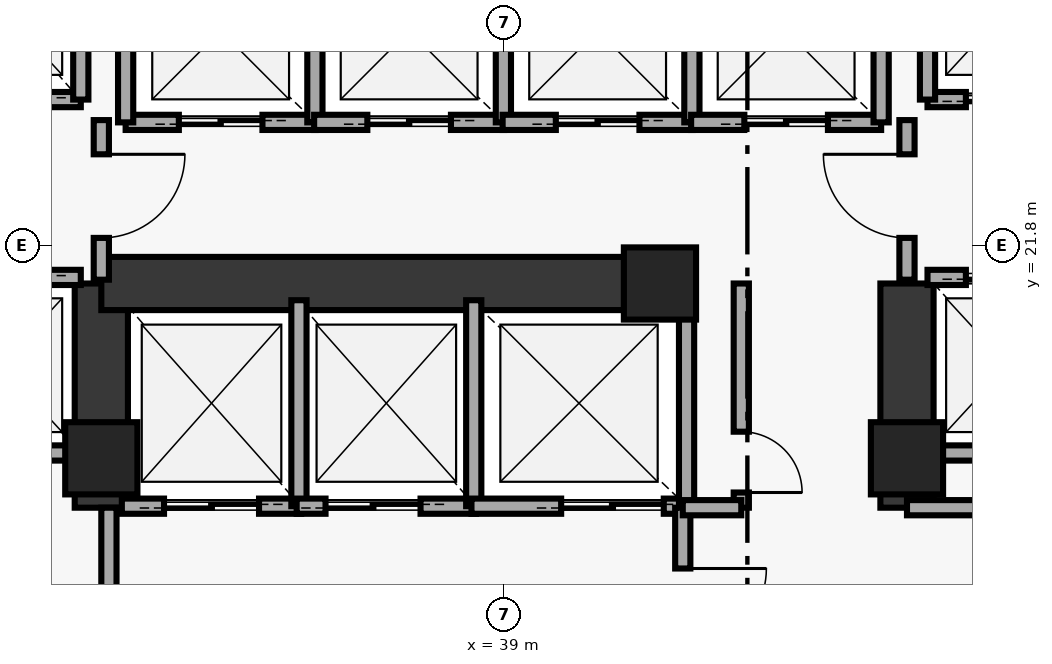
"""IFC4 building model, lengths in metres.
Left out: names, types, materials, properties, quantities, classifications, styles, units other than length and angle.
Written with IfcOpenShell. Run it as: python <this file> out.ifc"""

import sys

from ifc_helpers import new_model, si_unit, direction, frame, frame_2d, origin, origin_2d, place, context, subcontext, project, spatial, rectangle, extrude, element, fill, save


model = new_model("IFC4")
c1 = context("Model", 3, precision=1e-05, world=origin(), true_north=direction((0.0, 1.0)))
c2 = subcontext(c1, "Body", "Model", "MODEL_VIEW")
j1 = project(units=[si_unit("LENGTHUNIT", "METRE"), si_unit("PLANEANGLEUNIT", "RADIAN")], contexts=[c1])
p1 = place(None, origin())
s1 = spatial("IfcSite", under=j1, at=p1, CompositionType="ELEMENT")
p2 = place(p1, origin())
s2 = spatial("IfcBuilding", under=s1, at=p2, CompositionType="ELEMENT")
p3 = place(p2, frame((0.0, 0.0, 113.25)))
s3 = spatial("IfcBuildingStorey", under=s2, at=p3, CompositionType="ELEMENT", Elevation=113.25)
for number, where, z_axis, x_axis in (
    (1, (33.7, 19.0, 0.0), (0.0, 0.0, 1.0), (1.0, 0.0, 0.0)),
    (2, (41.05, 21.3, 0.0), (0.0, 0.0, 1.0), (1.0, 0.0, 0.0)),
    (3, (44.3, 19.0, 0.0), (0.0, 0.0, 1.0), (1.0, 0.0, 0.0)),
):
    element("IfcColumn", number, at=place(p3, frame(where, z_axis=z_axis, x_axis=x_axis)), inside=s3, PredefinedType="PILASTER", context=c2, shape_type="SweptSolid", body=[
        extrude(rectangle(XDim=0.95, YDim=0.95, at=origin_2d()), origin(), (0.0, 0.0, 1.0), 4.75),
    ])
for number, where, z_axis, x_axis in (
    (4, (33.7, 18.35, 0.0), (0.0, 0.0, 1.0), (0.0, 1.0, 0.0)),
    (5, (44.3, 18.35, 0.0), (0.0, 0.0, 1.0), (0.0, 1.0, 0.0)),
):
    element("IfcWall", number, at=place(p3, frame(where, z_axis=z_axis, x_axis=x_axis)), inside=s3, PredefinedType="SHEAR", context=c2, shape_type="SweptSolid", body=[
        extrude(rectangle(XDim=2.95, YDim=0.7, at=frame_2d((1.475, 0.0))), origin(), (0.0, 0.0, 1.0), 4.75),
    ])
p4 = place(p3, frame((33.7, 21.3, 0.0), z_axis=(0.0, 0.0, 1.0), x_axis=(1.0, 0.0, 0.0)))
e6 = element("IfcWall", 6, at=p4, inside=s3, PredefinedType="SHEAR", context=c2, shape_type="SweptSolid", body=[
    extrude(rectangle(XDim=7.55, YDim=0.7, at=frame_2d((3.775, 0.0))), origin(), (0.0, 0.0, 1.0), 4.75),
])
p5 = place(p3, frame((31.32, 23.72, 0.0), z_axis=(0.0, 0.0, 1.0), x_axis=(1.0, 0.0, 0.0)))
e7 = element("IfcWall", 7, at=p5, inside=s3, PredefinedType="SOLIDWALL", context=c2, shape_type="SweptSolid", body=[
    extrude(rectangle(XDim=2.11, YDim=0.2, at=frame_2d((1.055, 0.0))), origin(), (0.0, 0.0, 1.0), 4.75),
])
p6 = place(p5, frame((0.505, 0.0, 0.0)))
e8 = element("IfcOpeningElement", 8, at=p6, cuts=e7, PredefinedType="OPENING", context=c2, shape_type="SweptSolid", body=[
    extrude(rectangle(XDim=1.1, YDim=2.15, at=frame_2d((0.55, 1.075))), frame((0.0, 0.11, 0.0), z_axis=(0.0, -1.0, 0.0), x_axis=(1.0, 0.0, 0.0)), (0.0, 0.0, 1.0), 0.22),
])
p7 = place(p3, frame((33.43, 23.72, 0.0), z_axis=(0.0, 0.0, 1.0), x_axis=(0.0, 1.0, 0.0)))
e9 = element("IfcWall", 9, at=p7, inside=s3, PredefinedType="SOLIDWALL", context=c2, shape_type="SweptSolid", body=[
    extrude(rectangle(XDim=2.41, YDim=0.2, at=frame_2d((1.205, 0.0))), origin(), (0.0, 0.0, 1.0), 4.75),
])
p8 = place(p3, frame((31.32, 19.07, 0.0), z_axis=(0.0, 0.0, 1.0), x_axis=(1.0, 0.0, 0.0)))
e10 = element("IfcWall", 10, at=p8, inside=s3, PredefinedType="SOLIDWALL", context=c2, shape_type="SweptSolid", body=[
    extrude(rectangle(XDim=2.11, YDim=0.2, at=frame_2d((1.055, 0.0))), origin(), (0.0, 0.0, 1.0), 4.75),
])
p9 = place(p3, frame((31.32, 21.38, 0.0), z_axis=(0.0, 0.0, 1.0), x_axis=(1.0, 0.0, 0.0)))
e11 = element("IfcWall", 11, at=p9, inside=s3, PredefinedType="SOLIDWALL", context=c2, shape_type="SweptSolid", body=[
    extrude(rectangle(XDim=2.11, YDim=0.2, at=frame_2d((1.055, 0.0))), origin(), (0.0, 0.0, 1.0), 4.75),
])
p10 = place(p9, frame((0.505, 0.0, 0.0)))
e12 = element("IfcOpeningElement", 12, at=p10, cuts=e11, PredefinedType="OPENING", context=c2, shape_type="SweptSolid", body=[
    extrude(rectangle(XDim=1.1, YDim=2.15, at=frame_2d((0.55, 1.075))), frame((0.0, 0.11, 0.0), z_axis=(0.0, -1.0, 0.0), x_axis=(1.0, 0.0, 0.0)), (0.0, 0.0, 1.0), 0.22),
])
p11 = place(p3, frame((44.57, 23.72, 0.0), z_axis=(0.0, 0.0, 1.0), x_axis=(1.0, 0.0, 0.0)))
e13 = element("IfcWall", 13, at=p11, inside=s3, PredefinedType="SOLIDWALL", context=c2, shape_type="SweptSolid", body=[
    extrude(rectangle(XDim=2.11, YDim=0.2, at=frame_2d((1.055, 0.0))), origin(), (0.0, 0.0, 1.0), 4.75),
])
p12 = place(p11, frame((0.505, 0.0, 0.0)))
e14 = element("IfcOpeningElement", 14, at=p12, cuts=e13, PredefinedType="OPENING", context=c2, shape_type="SweptSolid", body=[
    extrude(rectangle(XDim=1.1, YDim=2.15, at=frame_2d((0.55, 1.075))), frame((0.0, 0.11, 0.0), z_axis=(0.0, -1.0, 0.0), x_axis=(1.0, 0.0, 0.0)), (0.0, 0.0, 1.0), 0.22),
])
p13 = place(p3, frame((44.57, 23.72, 0.0), z_axis=(0.0, 0.0, 1.0), x_axis=(0.0, 1.0, 0.0)))
e15 = element("IfcWall", 15, at=p13, inside=s3, PredefinedType="SOLIDWALL", context=c2, shape_type="SweptSolid", body=[
    extrude(rectangle(XDim=2.41, YDim=0.2, at=frame_2d((1.205, 0.0))), origin(), (0.0, 0.0, 1.0), 4.75),
])
p14 = place(p3, frame((44.57, 19.07, 0.0), z_axis=(0.0, 0.0, 1.0), x_axis=(1.0, 0.0, 0.0)))
e16 = element("IfcWall", 16, at=p14, inside=s3, PredefinedType="SOLIDWALL", context=c2, shape_type="SweptSolid", body=[
    extrude(rectangle(XDim=2.11, YDim=0.2, at=frame_2d((1.055, 0.0))), origin(), (0.0, 0.0, 1.0), 4.75),
])
p15 = place(p3, frame((44.57, 21.38, 0.0), z_axis=(0.0, 0.0, 1.0), x_axis=(1.0, 0.0, 0.0)))
e17 = element("IfcWall", 17, at=p15, inside=s3, PredefinedType="SOLIDWALL", context=c2, shape_type="SweptSolid", body=[
    extrude(rectangle(XDim=2.11, YDim=0.2, at=frame_2d((1.055, 0.0))), origin(), (0.0, 0.0, 1.0), 4.75),
])
p16 = place(p15, frame((0.505, 0.0, 0.0)))
e18 = element("IfcOpeningElement", 18, at=p16, cuts=e17, PredefinedType="OPENING", context=c2, shape_type="SweptSolid", body=[
    extrude(rectangle(XDim=1.1, YDim=2.15, at=frame_2d((0.55, 1.075))), frame((0.0, 0.11, 0.0), z_axis=(0.0, -1.0, 0.0), x_axis=(1.0, 0.0, 0.0)), (0.0, 0.0, 1.0), 0.22),
])
p17 = place(p3, frame((34.02, 23.42, 0.0), z_axis=(0.0, 0.0, 1.0), x_axis=(1.0, 0.0, 0.0)))
e19 = element("IfcWall", 19, at=p17, inside=s3, PredefinedType="SOLIDWALL", context=c2, shape_type="SweptSolid", body=[
    extrude(rectangle(XDim=2.5, YDim=0.2, at=frame_2d((1.25, 0.0))), origin(), (0.0, 0.0, 1.0), 4.75),
])
p18 = place(p17, frame((0.7, 0.0, 0.0)))
e20 = element("IfcOpeningElement", 20, at=p18, cuts=e19, PredefinedType="OPENING", context=c2, shape_type="SweptSolid", body=[
    extrude(rectangle(XDim=1.1, YDim=2.15, at=frame_2d((0.55, 1.075))), frame((0.0, 0.11, 0.0), z_axis=(0.0, -1.0, 0.0), x_axis=(1.0, 0.0, 0.0)), (0.0, 0.0, 1.0), 0.22),
])
for number, where, z_axis, x_axis in (
    (21, (34.02, 23.42, 0.0), (0.0, 0.0, 1.0), (0.0, 1.0, 0.0)),
    (22, (36.51, 23.42, 0.0), (0.0, 0.0, 1.0), (0.0, 1.0, 0.0)),
):
    element("IfcWall", number, at=place(p3, frame(where, z_axis=z_axis, x_axis=x_axis)), inside=s3, PredefinedType="SOLIDWALL", context=c2, shape_type="SweptSolid", body=[
        extrude(rectangle(XDim=2.41, YDim=0.2, at=frame_2d((1.205, 0.0))), origin(), (0.0, 0.0, 1.0), 4.75),
    ])
p19 = place(p3, frame((36.5, 23.42, 0.0), z_axis=(0.0, 0.0, 1.0), x_axis=(1.0, 0.0, 0.0)))
e23 = element("IfcWall", 23, at=p19, inside=s3, PredefinedType="SOLIDWALL", context=c2, shape_type="SweptSolid", body=[
    extrude(rectangle(XDim=2.5, YDim=0.2, at=frame_2d((1.25, 0.0))), origin(), (0.0, 0.0, 1.0), 4.75),
])
p20 = place(p19, frame((0.7, 0.0, 0.0)))
e24 = element("IfcOpeningElement", 24, at=p20, cuts=e23, PredefinedType="OPENING", context=c2, shape_type="SweptSolid", body=[
    extrude(rectangle(XDim=1.1, YDim=2.15, at=frame_2d((0.55, 1.075))), frame((0.0, 0.11, 0.0), z_axis=(0.0, -1.0, 0.0), x_axis=(1.0, 0.0, 0.0)), (0.0, 0.0, 1.0), 0.22),
])
p21 = place(p3, frame((38.99, 23.42, 0.0), z_axis=(0.0, 0.0, 1.0), x_axis=(0.0, 1.0, 0.0)))
e25 = element("IfcWall", 25, at=p21, inside=s3, PredefinedType="SOLIDWALL", context=c2, shape_type="SweptSolid", body=[
    extrude(rectangle(XDim=2.41, YDim=0.2, at=frame_2d((1.205, 0.0))), origin(), (0.0, 0.0, 1.0), 4.75),
])
p22 = place(p3, frame((38.98, 23.42, 0.0), z_axis=(0.0, 0.0, 1.0), x_axis=(1.0, 0.0, 0.0)))
e26 = element("IfcWall", 26, at=p22, inside=s3, PredefinedType="SOLIDWALL", context=c2, shape_type="SweptSolid", body=[
    extrude(rectangle(XDim=2.5, YDim=0.2, at=frame_2d((1.25, 0.0))), origin(), (0.0, 0.0, 1.0), 4.75),
])
p23 = place(p22, frame((0.7, 0.0, 0.0)))
e27 = element("IfcOpeningElement", 27, at=p23, cuts=e26, PredefinedType="OPENING", context=c2, shape_type="SweptSolid", body=[
    extrude(rectangle(XDim=1.1, YDim=2.15, at=frame_2d((0.55, 1.075))), frame((0.0, 0.11, 0.0), z_axis=(0.0, -1.0, 0.0), x_axis=(1.0, 0.0, 0.0)), (0.0, 0.0, 1.0), 0.22),
])
p24 = place(p3, frame((41.47, 23.42, 0.0), z_axis=(0.0, 0.0, 1.0), x_axis=(0.0, 1.0, 0.0)))
e28 = element("IfcWall", 28, at=p24, inside=s3, PredefinedType="SOLIDWALL", context=c2, shape_type="SweptSolid", body=[
    extrude(rectangle(XDim=2.41, YDim=0.2, at=frame_2d((1.205, 0.0))), origin(), (0.0, 0.0, 1.0), 4.75),
])
p25 = place(p3, frame((41.46, 23.42, 0.0), z_axis=(0.0, 0.0, 1.0), x_axis=(1.0, 0.0, 0.0)))
e29 = element("IfcWall", 29, at=p25, inside=s3, PredefinedType="SOLIDWALL", context=c2, shape_type="SweptSolid", body=[
    extrude(rectangle(XDim=2.5, YDim=0.2, at=frame_2d((1.25, 0.0))), origin(), (0.0, 0.0, 1.0), 4.75),
])
p26 = place(p25, frame((0.7, 0.0, 0.0)))
e30 = element("IfcOpeningElement", 30, at=p26, cuts=e29, PredefinedType="OPENING", context=c2, shape_type="SweptSolid", body=[
    extrude(rectangle(XDim=1.1, YDim=2.15, at=frame_2d((0.55, 1.075))), frame((0.0, 0.11, 0.0), z_axis=(0.0, -1.0, 0.0), x_axis=(1.0, 0.0, 0.0)), (0.0, 0.0, 1.0), 0.22),
])
p27 = place(p3, frame((43.96, 23.42, 0.0), z_axis=(0.0, 0.0, 1.0), x_axis=(0.0, 1.0, 0.0)))
e31 = element("IfcWall", 31, at=p27, inside=s3, PredefinedType="SOLIDWALL", context=c2, shape_type="SweptSolid", body=[
    extrude(rectangle(XDim=2.41, YDim=0.2, at=frame_2d((1.205, 0.0))), origin(), (0.0, 0.0, 1.0), 4.75),
])
p28 = place(p3, frame((33.97, 18.37, 0.0), z_axis=(0.0, 0.0, 1.0), x_axis=(1.0, 0.0, 0.0)))
e32 = element("IfcWall", 32, at=p28, inside=s3, PredefinedType="SOLIDWALL", context=c2, shape_type="SweptSolid", body=[
    extrude(rectangle(XDim=2.36, YDim=0.2, at=frame_2d((1.18, 0.0))), origin(), (0.0, 0.0, 1.0), 4.75),
])
p29 = place(p28, frame((0.555, 0.0, 0.0)))
e33 = element("IfcOpeningElement", 33, at=p29, cuts=e32, PredefinedType="OPENING", context=c2, shape_type="SweptSolid", body=[
    extrude(rectangle(XDim=1.25, YDim=2.2, at=frame_2d((0.625, 1.1))), frame((0.0, 0.11, 0.0), z_axis=(0.0, -1.0, 0.0), x_axis=(1.0, 0.0, 0.0)), (0.0, 0.0, 1.0), 0.22),
])
p30 = place(p3, frame((36.3, 18.37, 0.0), z_axis=(0.0, 0.0, 1.0), x_axis=(0.0, 1.0, 0.0)))
e34 = element("IfcWall", 34, at=p30, inside=s3, PredefinedType="SOLIDWALL", context=c2, shape_type="SweptSolid", body=[
    extrude(rectangle(XDim=2.71, YDim=0.2, at=frame_2d((1.355, 0.0))), origin(), (0.0, 0.0, 1.0), 4.75),
])
p31 = place(p3, frame((36.27, 18.37, 0.0), z_axis=(0.0, 0.0, 1.0), x_axis=(1.0, 0.0, 0.0)))
e35 = element("IfcWall", 35, at=p31, inside=s3, PredefinedType="SOLIDWALL", context=c2, shape_type="SweptSolid", body=[
    extrude(rectangle(XDim=2.36, YDim=0.2, at=frame_2d((1.18, 0.0))), origin(), (0.0, 0.0, 1.0), 4.75),
])
p32 = place(p31, frame((0.38, 0.0, 0.0)))
e36 = element("IfcOpeningElement", 36, at=p32, cuts=e35, PredefinedType="OPENING", context=c2, shape_type="SweptSolid", body=[
    extrude(rectangle(XDim=1.25, YDim=2.2, at=frame_2d((0.625, 1.1))), frame((0.0, 0.11, 0.0), z_axis=(0.0, -1.0, 0.0), x_axis=(1.0, 0.0, 0.0)), (0.0, 0.0, 1.0), 0.22),
])
p33 = place(p3, frame((38.6, 18.37, 0.0), z_axis=(0.0, 0.0, 1.0), x_axis=(0.0, 1.0, 0.0)))
e37 = element("IfcWall", 37, at=p33, inside=s3, PredefinedType="SOLIDWALL", context=c2, shape_type="SweptSolid", body=[
    extrude(rectangle(XDim=2.71, YDim=0.2, at=frame_2d((1.355, 0.0))), origin(), (0.0, 0.0, 1.0), 4.75),
])
p34 = place(p3, frame((38.57, 18.37, 0.0), z_axis=(0.0, 0.0, 1.0), x_axis=(1.0, 0.0, 0.0)))
e38 = element("IfcWall", 38, at=p34, inside=s3, PredefinedType="SOLIDWALL", context=c2, shape_type="SweptSolid", body=[
    extrude(rectangle(XDim=2.83, YDim=0.2, at=frame_2d((1.415, 0.0))), origin(), (0.0, 0.0, 1.0), 4.75),
])
p35 = place(p34, frame((1.18, 0.0, 0.0)))
e39 = element("IfcOpeningElement", 39, at=p35, cuts=e38, PredefinedType="OPENING", context=c2, shape_type="SweptSolid", body=[
    extrude(rectangle(XDim=1.35, YDim=2.18, at=frame_2d((0.675, 1.09))), frame((0.0, 0.11, 0.0), z_axis=(0.0, -1.0, 0.0), x_axis=(1.0, 0.0, 0.0)), (0.0, 0.0, 1.0), 0.22),
])
p36 = place(p3, frame((41.4, 18.37, 0.0), z_axis=(0.0, 0.0, 1.0), x_axis=(0.0, 1.0, 0.0)))
e40 = element("IfcWall", 40, at=p36, inside=s3, PredefinedType="SOLIDWALL", context=c2, shape_type="SweptSolid", body=[
    extrude(rectangle(XDim=2.71, YDim=0.2, at=frame_2d((1.355, 0.0))), origin(), (0.0, 0.0, 1.0), 4.75),
])
p37 = place(p3, frame((33.7, 21.35, 0.0), z_axis=(0.0, 0.0, 1.0), x_axis=(0.0, 1.0, 0.0)))
e41 = element("IfcWall", 41, at=p37, inside=s3, PredefinedType="SOLIDWALL", context=c2, shape_type="SweptSolid", body=[
    extrude(rectangle(XDim=2.1, YDim=0.2, at=frame_2d((1.05, 0.0))), origin(), (0.0, 0.0, 1.0), 4.135),
])
p38 = place(p37, frame((0.55, 0.0, 0.0)))
e42 = element("IfcOpeningElement", 42, at=p38, cuts=e41, PredefinedType="OPENING", context=c2, shape_type="SweptSolid", body=[
    extrude(rectangle(XDim=1.1, YDim=2.15, at=frame_2d((0.55, 1.075))), frame((0.0, 0.11, 0.0), z_axis=(0.0, -1.0, 0.0), x_axis=(1.0, 0.0, 0.0)), (0.0, 0.0, 1.0), 0.22),
])
p39 = place(p3, frame((44.3, 21.35, 0.0), z_axis=(0.0, 0.0, 1.0), x_axis=(0.0, 1.0, 0.0)))
e43 = element("IfcWall", 43, at=p39, inside=s3, PredefinedType="SOLIDWALL", context=c2, shape_type="SweptSolid", body=[
    extrude(rectangle(XDim=2.1, YDim=0.2, at=frame_2d((1.05, 0.0))), origin(), (0.0, 0.0, 1.0), 4.135),
])
p40 = place(p39, frame((0.55, 0.0, 0.0)))
e44 = element("IfcOpeningElement", 44, at=p40, cuts=e43, PredefinedType="OPENING", context=c2, shape_type="SweptSolid", body=[
    extrude(rectangle(XDim=1.1, YDim=2.15, at=frame_2d((0.55, 1.075))), frame((0.0, 0.11, 0.0), z_axis=(0.0, -1.0, 0.0), x_axis=(1.0, 0.0, 0.0)), (0.0, 0.0, 1.0), 0.22),
])
p41 = place(p3, frame((33.8, 15.55, 0.0), z_axis=(0.0, 0.0, 1.0), x_axis=(0.0, 1.0, 0.0)))
e45 = element("IfcWall", 45, at=p41, inside=s3, PredefinedType="SOLIDWALL", context=c2, shape_type="SweptSolid", body=[
    extrude(rectangle(XDim=2.8, YDim=0.2, at=frame_2d((1.4, 0.0))), origin(), (0.0, 0.0, 1.0), 4.75),
])
p42 = place(p3, frame((41.35, 15.55, 0.0), z_axis=(0.0, 0.0, 1.0), x_axis=(0.0, 1.0, 0.0)))
e46 = element("IfcWall", 46, at=p42, inside=s3, PredefinedType="SOLIDWALL", context=c2, shape_type="SweptSolid", body=[
    extrude(rectangle(XDim=2.8, YDim=0.2, at=frame_2d((1.4, 0.0))), origin(), (0.0, 0.0, 1.0), 4.75),
])
p43 = place(p42, frame((0.9, 0.0, 0.0)))
e47 = element("IfcOpeningElement", 47, at=p43, cuts=e46, PredefinedType="OPENING", context=c2, shape_type="SweptSolid", body=[
    extrude(rectangle(XDim=1.1, YDim=2.15, at=frame_2d((0.55, 1.075))), frame((0.0, 0.11, 0.0), z_axis=(0.0, -1.0, 0.0), x_axis=(1.0, 0.0, 0.0)), (0.0, 0.0, 1.0), 0.22),
])
p44 = place(p3, frame((44.3, 18.35, 0.0), z_axis=(0.0, 0.0, 1.0), x_axis=(1.0, 0.0, 0.0)))
e48 = element("IfcWall", 48, at=p44, inside=s3, PredefinedType="SOLIDWALL", context=c2, shape_type="SweptSolid", body=[
    extrude(rectangle(XDim=1.55, YDim=0.2, at=frame_2d((0.775, 0.0))), origin(), (0.0, 0.0, 1.0), 4.75),
])
p45 = place(p3, frame((42.12, 18.35, 0.0), z_axis=(0.0, 0.0, 1.0), x_axis=(0.0, 1.0, 0.0)))
e49 = element("IfcWall", 49, at=p45, inside=s3, PredefinedType="SOLIDWALL", context=c2, shape_type="SweptSolid", body=[
    extrude(rectangle(XDim=2.95, YDim=0.2, at=frame_2d((1.475, 0.0))), origin(), (0.0, 0.0, 1.0), 4.75),
])
p46 = place(p45, frame((0.2, 0.0, 0.0)))
e50 = element("IfcOpeningElement", 50, at=p46, cuts=e49, PredefinedType="OPENING", context=c2, shape_type="SweptSolid", body=[
    extrude(rectangle(XDim=0.8, YDim=2.05, at=frame_2d((0.4, 1.025))), frame((0.0, 0.11, 0.0), z_axis=(0.0, -1.0, 0.0), x_axis=(1.0, 0.0, 0.0)), (0.0, 0.0, 1.0), 0.22),
])
p47 = place(p3, frame((41.35, 18.35, 0.0), z_axis=(0.0, 0.0, 1.0), x_axis=(1.0, 0.0, 0.0)))
e51 = element("IfcWall", 51, at=p47, inside=s3, PredefinedType="SOLIDWALL", context=c2, shape_type="SweptSolid", body=[
    extrude(rectangle(XDim=0.77, YDim=0.2, at=frame_2d((0.385, 0.0))), origin(), (0.0, 0.0, 1.0), 4.75),
])
p48 = place(p12, origin())
e52 = element("IfcDoor", 52, at=p48, inside=s3, OperationType="DOUBLE_DOOR_SLIDING", PredefinedType="DOOR", context=c2, shape_type="SweptSolid", body=[
    extrude(rectangle(XDim=1.1, YDim=2.15, at=frame_2d((0.55, 1.075))), frame((0.0, 0.025, 0.0), z_axis=(0.0, -1.0, 0.0), x_axis=(1.0, 0.0, 0.0)), (0.0, 0.0, 1.0), 0.05),
])
fill(e14, e52)
p49 = place(p16, origin())
e53 = element("IfcDoor", 53, at=p49, inside=s3, OperationType="DOUBLE_DOOR_SLIDING", PredefinedType="DOOR", context=c2, shape_type="SweptSolid", body=[
    extrude(rectangle(XDim=1.1, YDim=2.15, at=frame_2d((0.55, 1.075))), frame((0.0, 0.025, 0.0), z_axis=(0.0, -1.0, 0.0), x_axis=(1.0, 0.0, 0.0)), (0.0, 0.0, 1.0), 0.05),
])
fill(e18, e53)
p50 = place(p18, origin())
e54 = element("IfcDoor", 54, at=p50, inside=s3, OperationType="DOUBLE_DOOR_SLIDING", PredefinedType="DOOR", context=c2, shape_type="SweptSolid", body=[
    extrude(rectangle(XDim=1.1, YDim=2.15, at=frame_2d((0.55, 1.075))), frame((0.0, 0.025, 0.0), z_axis=(0.0, -1.0, 0.0), x_axis=(1.0, 0.0, 0.0)), (0.0, 0.0, 1.0), 0.05),
])
fill(e20, e54)
p51 = place(p20, origin())
e55 = element("IfcDoor", 55, at=p51, inside=s3, OperationType="DOUBLE_DOOR_SLIDING", PredefinedType="DOOR", context=c2, shape_type="SweptSolid", body=[
    extrude(rectangle(XDim=1.1, YDim=2.15, at=frame_2d((0.55, 1.075))), frame((0.0, 0.025, 0.0), z_axis=(0.0, -1.0, 0.0), x_axis=(1.0, 0.0, 0.0)), (0.0, 0.0, 1.0), 0.05),
])
fill(e24, e55)
p52 = place(p23, origin())
e56 = element("IfcDoor", 56, at=p52, inside=s3, OperationType="DOUBLE_DOOR_SLIDING", PredefinedType="DOOR", context=c2, shape_type="SweptSolid", body=[
    extrude(rectangle(XDim=1.1, YDim=2.15, at=frame_2d((0.55, 1.075))), frame((0.0, 0.025, 0.0), z_axis=(0.0, -1.0, 0.0), x_axis=(1.0, 0.0, 0.0)), (0.0, 0.0, 1.0), 0.05),
])
fill(e27, e56)
p53 = place(p26, origin())
e57 = element("IfcDoor", 57, at=p53, inside=s3, OperationType="DOUBLE_DOOR_SLIDING", PredefinedType="DOOR", context=c2, shape_type="SweptSolid", body=[
    extrude(rectangle(XDim=1.1, YDim=2.15, at=frame_2d((0.55, 1.075))), frame((0.0, 0.025, 0.0), z_axis=(0.0, -1.0, 0.0), x_axis=(1.0, 0.0, 0.0)), (0.0, 0.0, 1.0), 0.05),
])
fill(e30, e57)
p54 = place(p29, origin())
e58 = element("IfcDoor", 58, at=p54, inside=s3, OperationType="DOUBLE_DOOR_SLIDING", PredefinedType="DOOR", context=c2, shape_type="SweptSolid", body=[
    extrude(rectangle(XDim=1.25, YDim=2.2, at=frame_2d((0.625, 1.1))), frame((0.0, 0.025, 0.0), z_axis=(0.0, -1.0, 0.0), x_axis=(1.0, 0.0, 0.0)), (0.0, 0.0, 1.0), 0.05),
])
fill(e33, e58)
p55 = place(p32, origin())
e59 = element("IfcDoor", 59, at=p55, inside=s3, OperationType="DOUBLE_DOOR_SLIDING", PredefinedType="DOOR", context=c2, shape_type="SweptSolid", body=[
    extrude(rectangle(XDim=1.25, YDim=2.2, at=frame_2d((0.625, 1.1))), frame((0.0, 0.025, 0.0), z_axis=(0.0, -1.0, 0.0), x_axis=(1.0, 0.0, 0.0)), (0.0, 0.0, 1.0), 0.05),
])
fill(e36, e59)
p56 = place(p35, origin())
e60 = element("IfcDoor", 60, at=p56, inside=s3, OperationType="DOUBLE_DOOR_SLIDING", PredefinedType="DOOR", context=c2, shape_type="SweptSolid", body=[
    extrude(rectangle(XDim=1.35, YDim=2.18, at=frame_2d((0.675, 1.09))), frame((0.0, 0.025, 0.0), z_axis=(0.0, -1.0, 0.0), x_axis=(1.0, 0.0, 0.0)), (0.0, 0.0, 1.0), 0.05),
])
fill(e39, e60)
p57 = place(p38, origin())
e61 = element("IfcDoor", 61, at=p57, inside=s3, OperationType="SINGLE_SWING_RIGHT", PredefinedType="DOOR", context=c2, shape_type="SweptSolid", body=[
    extrude(rectangle(XDim=1.1, YDim=2.15, at=frame_2d((0.55, 1.075))), frame((0.0, 0.025, 0.0), z_axis=(0.0, -1.0, 0.0), x_axis=(1.0, 0.0, 0.0)), (0.0, 0.0, 1.0), 0.05),
])
fill(e42, e61)
p58 = place(p40, origin())
e62 = element("IfcDoor", 62, at=p58, inside=s3, OperationType="SINGLE_SWING_RIGHT", PredefinedType="DOOR", context=c2, shape_type="SweptSolid", body=[
    extrude(rectangle(XDim=1.1, YDim=2.15, at=frame_2d((0.55, 1.075))), frame((0.0, 0.025, 0.0), z_axis=(0.0, -1.0, 0.0), x_axis=(1.0, 0.0, 0.0)), (0.0, 0.0, 1.0), 0.05),
])
fill(e44, e62)
p59 = place(p43, origin())
e63 = element("IfcDoor", 63, at=p59, inside=s3, OperationType="SINGLE_SWING_RIGHT", PredefinedType="DOOR", context=c2, shape_type="SweptSolid", body=[
    extrude(rectangle(XDim=1.1, YDim=2.15, at=frame_2d((0.55, 1.075))), frame((0.0, 0.025, 0.0), z_axis=(0.0, -1.0, 0.0), x_axis=(1.0, 0.0, 0.0)), (0.0, 0.0, 1.0), 0.05),
])
fill(e47, e63)
p60 = place(p46, origin())
e64 = element("IfcDoor", 64, at=p60, inside=s3, OperationType="SINGLE_SWING_LEFT", PredefinedType="DOOR", context=c2, shape_type="SweptSolid", body=[
    extrude(rectangle(XDim=0.8, YDim=2.05, at=frame_2d((0.4, 1.025))), frame((0.0, 0.025, 0.0), z_axis=(0.0, -1.0, 0.0), x_axis=(1.0, 0.0, 0.0)), (0.0, 0.0, 1.0), 0.05),
])
fill(e50, e64)
save(model, sys.argv[1])
